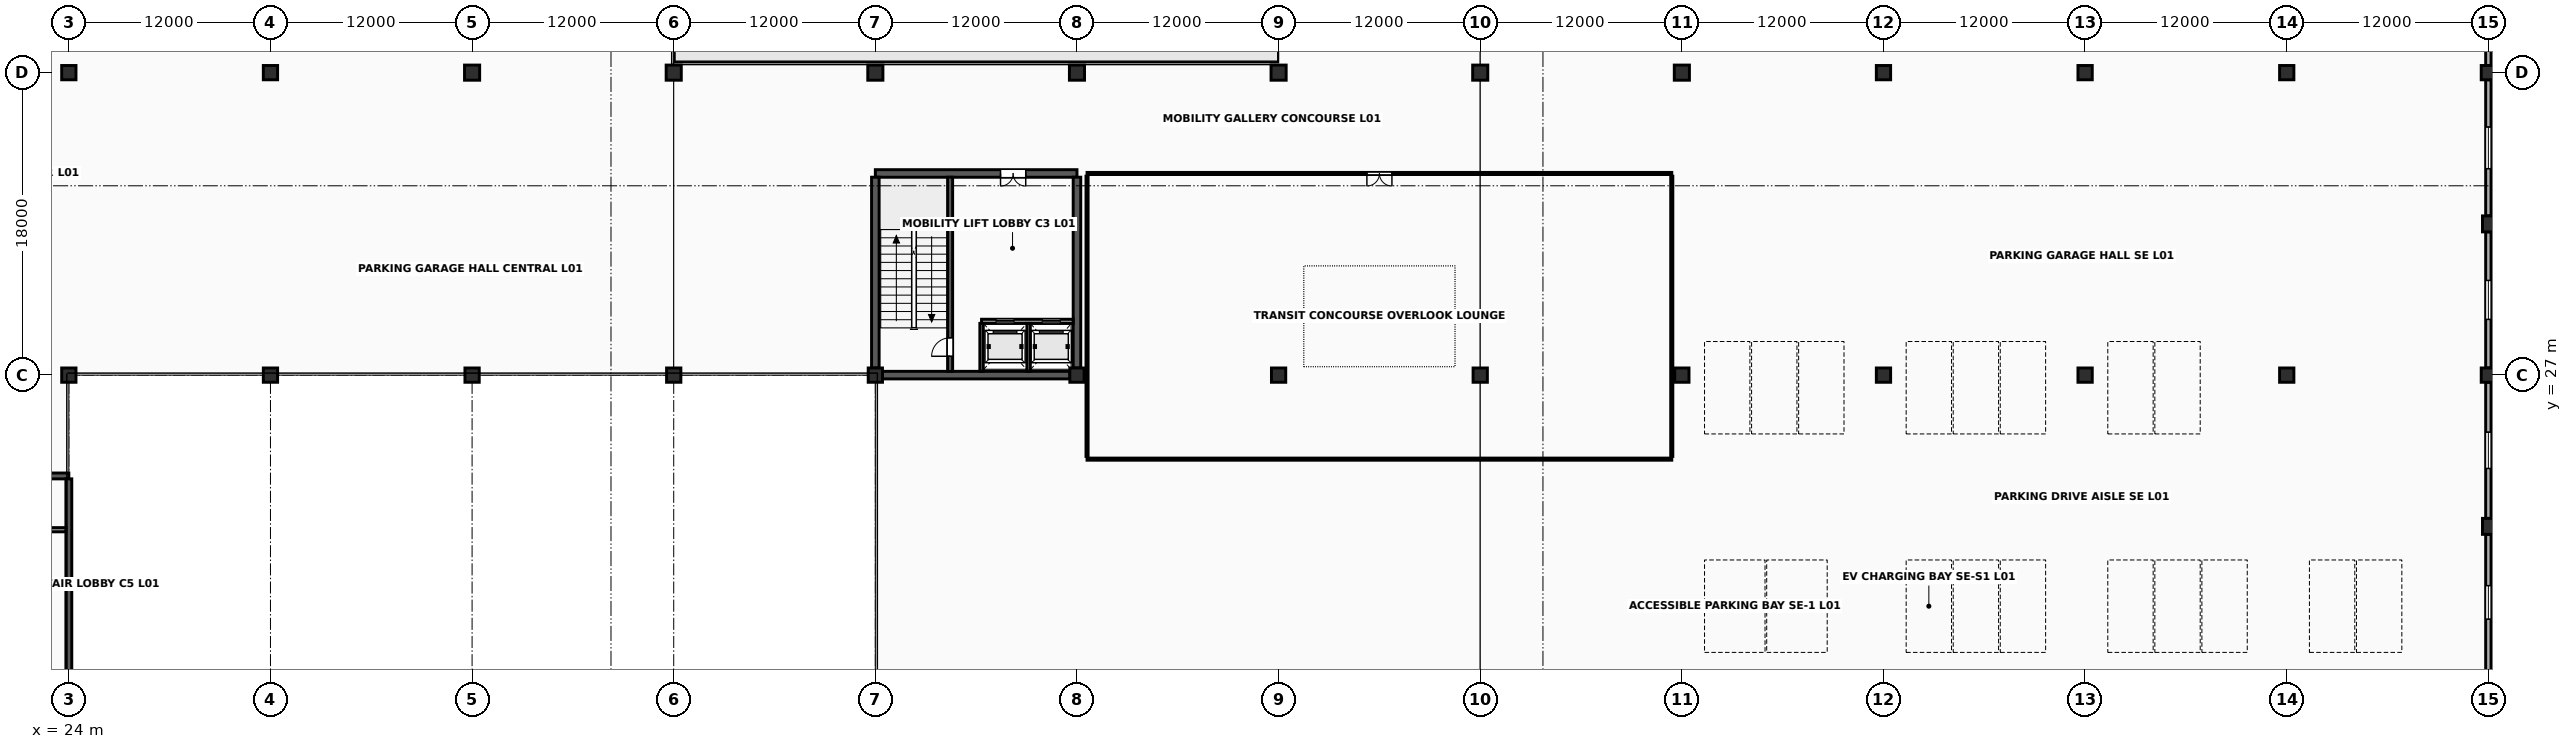
"""IFC4 building model, lengths in metres.
Left out: names, types, materials, properties, quantities, classifications, styles, units other than length and angle.
Written with IfcOpenShell. Run it as: python <this file> out.ifc"""

import sys

from ifc_helpers import new_model, si_unit, direction, frame, frame_2d, origin, origin_2d, place, context, subcontext, project, spatial, rectangle, extrude, element, fill, save


model = new_model("IFC4")
c1 = context("Model", 3, precision=1e-05, world=origin(), true_north=direction((0.0, 1.0)))
c2 = subcontext(c1, "Body", "Model", "MODEL_VIEW")
j1 = project(units=[si_unit("LENGTHUNIT", "METRE"), si_unit("PLANEANGLEUNIT", "RADIAN")], contexts=[c1])
p1 = place(None, origin())
s1 = spatial("IfcSite", under=j1, at=p1, CompositionType="ELEMENT")
p2 = place(p1, origin())
s2 = spatial("IfcBuilding", under=s1, at=p2, CompositionType="ELEMENT")
p3 = place(p2, frame((0.0, 0.0, 5.4)))
s3 = spatial("IfcBuildingStorey", under=s2, at=p3, CompositionType="ELEMENT", Elevation=5.4)
for number, where, z_axis, x_axis in (
    (1, (24.0, 27.0, 0.0), (0.0, 0.0, 1.0), (1.0, 0.0, 0.0)),
    (2, (24.0, 45.0, 0.0), (0.0, 0.0, 1.0), (1.0, 0.0, 0.0)),
    (3, (36.0, 27.0, 0.0), (0.0, 0.0, 1.0), (1.0, 0.0, 0.0)),
    (4, (36.0, 45.0, 0.0), (0.0, 0.0, 1.0), (1.0, 0.0, 0.0)),
    (5, (48.0, 27.0, 0.0), (0.0, 0.0, 1.0), (1.0, 0.0, 0.0)),
):
    element("IfcColumn", number, at=place(p3, frame(where, z_axis=z_axis, x_axis=x_axis)), inside=s3, PredefinedType="COLUMN", context=c2, shape_type="SweptSolid", body=[
        extrude(rectangle(XDim=0.85, YDim=0.85, at=origin_2d()), origin(), (0.0, 0.0, 1.0), 4.2),
    ])
p4 = place(p3, frame((48.0, 45.0, 0.0), z_axis=(0.0, 0.0, 1.0), x_axis=(1.0, 0.0, 0.0)))
e6 = element("IfcColumn", 6, at=p4, inside=s3, PredefinedType="COLUMN", context=c2, shape_type="SweptSolid", body=[
    extrude(rectangle(XDim=0.9, YDim=0.9, at=origin_2d()), origin(), (0.0, 0.0, 1.0), 4.2),
])
p5 = place(p3, frame((60.0, 27.0, 0.0), z_axis=(0.0, 0.0, 1.0), x_axis=(1.0, 0.0, 0.0)))
e7 = element("IfcColumn", 7, at=p5, inside=s3, PredefinedType="COLUMN", context=c2, shape_type="SweptSolid", body=[
    extrude(rectangle(XDim=0.85, YDim=0.85, at=origin_2d()), origin(), (0.0, 0.0, 1.0), 4.2),
])
p6 = place(p3, frame((60.0, 45.0, 0.0), z_axis=(0.0, 0.0, 1.0), x_axis=(1.0, 0.0, 0.0)))
e8 = element("IfcColumn", 8, at=p6, inside=s3, PredefinedType="COLUMN", context=c2, shape_type="SweptSolid", body=[
    extrude(rectangle(XDim=0.9, YDim=0.9, at=origin_2d()), origin(), (0.0, 0.0, 1.0), 4.2),
])
p7 = place(p3, frame((72.0, 27.0, 0.0), z_axis=(0.0, 0.0, 1.0), x_axis=(1.0, 0.0, 0.0)))
e9 = element("IfcColumn", 9, at=p7, inside=s3, PredefinedType="COLUMN", context=c2, shape_type="SweptSolid", body=[
    extrude(rectangle(XDim=0.85, YDim=0.85, at=origin_2d()), origin(), (0.0, 0.0, 1.0), 4.2),
])
p8 = place(p3, frame((72.0, 45.0, 0.0), z_axis=(0.0, 0.0, 1.0), x_axis=(1.0, 0.0, 0.0)))
e10 = element("IfcColumn", 10, at=p8, inside=s3, PredefinedType="COLUMN", context=c2, shape_type="SweptSolid", body=[
    extrude(rectangle(XDim=0.9, YDim=0.9, at=origin_2d()), origin(), (0.0, 0.0, 1.0), 4.2),
])
p9 = place(p3, frame((84.0, 27.0, 0.0), z_axis=(0.0, 0.0, 1.0), x_axis=(1.0, 0.0, 0.0)))
e11 = element("IfcColumn", 11, at=p9, inside=s3, PredefinedType="COLUMN", context=c2, shape_type="SweptSolid", body=[
    extrude(rectangle(XDim=0.85, YDim=0.85, at=origin_2d()), origin(), (0.0, 0.0, 1.0), 4.2),
])
p10 = place(p3, frame((84.0, 45.0, 0.0), z_axis=(0.0, 0.0, 1.0), x_axis=(1.0, 0.0, 0.0)))
e12 = element("IfcColumn", 12, at=p10, inside=s3, PredefinedType="COLUMN", context=c2, shape_type="SweptSolid", body=[
    extrude(rectangle(XDim=0.9, YDim=0.9, at=origin_2d()), origin(), (0.0, 0.0, 1.0), 4.2),
])
p11 = place(p3, frame((96.0, 27.0, 0.0), z_axis=(0.0, 0.0, 1.0), x_axis=(1.0, 0.0, 0.0)))
e13 = element("IfcColumn", 13, at=p11, inside=s3, PredefinedType="COLUMN", context=c2, shape_type="SweptSolid", body=[
    extrude(rectangle(XDim=0.85, YDim=0.85, at=origin_2d()), origin(), (0.0, 0.0, 1.0), 4.2),
])
p12 = place(p3, frame((96.0, 45.0, 0.0), z_axis=(0.0, 0.0, 1.0), x_axis=(1.0, 0.0, 0.0)))
e14 = element("IfcColumn", 14, at=p12, inside=s3, PredefinedType="COLUMN", context=c2, shape_type="SweptSolid", body=[
    extrude(rectangle(XDim=0.9, YDim=0.9, at=origin_2d()), origin(), (0.0, 0.0, 1.0), 4.2),
])
p13 = place(p3, frame((108.0, 27.0, 0.0), z_axis=(0.0, 0.0, 1.0), x_axis=(1.0, 0.0, 0.0)))
e15 = element("IfcColumn", 15, at=p13, inside=s3, PredefinedType="COLUMN", context=c2, shape_type="SweptSolid", body=[
    extrude(rectangle(XDim=0.85, YDim=0.85, at=origin_2d()), origin(), (0.0, 0.0, 1.0), 4.2),
])
p14 = place(p3, frame((108.0, 45.0, 0.0), z_axis=(0.0, 0.0, 1.0), x_axis=(1.0, 0.0, 0.0)))
e16 = element("IfcColumn", 16, at=p14, inside=s3, PredefinedType="COLUMN", context=c2, shape_type="SweptSolid", body=[
    extrude(rectangle(XDim=0.9, YDim=0.9, at=origin_2d()), origin(), (0.0, 0.0, 1.0), 4.2),
])
p15 = place(p3, frame((120.0, 27.0, 0.0), z_axis=(0.0, 0.0, 1.0), x_axis=(1.0, 0.0, 0.0)))
e17 = element("IfcColumn", 17, at=p15, inside=s3, PredefinedType="COLUMN", context=c2, shape_type="SweptSolid", body=[
    extrude(rectangle(XDim=0.85, YDim=0.85, at=origin_2d()), origin(), (0.0, 0.0, 1.0), 4.2),
])
p16 = place(p3, frame((120.0, 45.0, 0.0), z_axis=(0.0, 0.0, 1.0), x_axis=(1.0, 0.0, 0.0)))
e18 = element("IfcColumn", 18, at=p16, inside=s3, PredefinedType="COLUMN", context=c2, shape_type="SweptSolid", body=[
    extrude(rectangle(XDim=0.9, YDim=0.9, at=origin_2d()), origin(), (0.0, 0.0, 1.0), 4.2),
])
for number, where, z_axis, x_axis in (
    (19, (132.0, 27.0, 0.0), (0.0, 0.0, 1.0), (1.0, 0.0, 0.0)),
    (20, (132.0, 45.0, 0.0), (0.0, 0.0, 1.0), (1.0, 0.0, 0.0)),
    (21, (144.0, 27.0, 0.0), (0.0, 0.0, 1.0), (1.0, 0.0, 0.0)),
    (22, (144.0, 45.0, 0.0), (0.0, 0.0, 1.0), (1.0, 0.0, 0.0)),
    (23, (156.0, 27.0, 0.0), (0.0, 0.0, 1.0), (1.0, 0.0, 0.0)),
    (24, (156.0, 45.0, 0.0), (0.0, 0.0, 1.0), (1.0, 0.0, 0.0)),
    (25, (168.0, 27.0, 0.0), (0.0, 0.0, 1.0), (1.0, 0.0, 0.0)),
    (26, (168.0, 45.0, 0.0), (0.0, 0.0, 1.0), (1.0, 0.0, 0.0)),
):
    element("IfcColumn", number, at=place(p3, frame(where, z_axis=z_axis, x_axis=x_axis)), inside=s3, PredefinedType="COLUMN", context=c2, shape_type="SweptSolid", body=[
        extrude(rectangle(XDim=0.85, YDim=0.85, at=origin_2d()), origin(), (0.0, 0.0, 1.0), 4.2),
    ])
for number, where, z_axis, x_axis in (
    (27, (168.0, 18.0, 0.0), (0.0, 0.0, 1.0), (1.0, 0.0, 0.0)),
    (28, (168.0, 36.0, 0.0), (0.0, 0.0, 1.0), (1.0, 0.0, 0.0)),
):
    element("IfcColumn", number, at=place(p3, frame(where, z_axis=z_axis, x_axis=x_axis)), inside=s3, PredefinedType="PILASTER", context=c2, shape_type="SweptSolid", body=[
        extrude(rectangle(XDim=0.7, YDim=0.95, at=origin_2d()), origin(), (0.0, 0.0, 1.0), 4.2),
    ])
p17 = place(p3, frame((72.422, 27.0, 0.0), z_axis=(0.0, 0.0, 1.0), x_axis=(1.0, 0.0, 0.0)))
e29 = element("IfcWall", 29, at=p17, inside=s3, PredefinedType="SHEAR", context=c2, shape_type="SweptSolid", body=[
    extrude(rectangle(XDim=11.156, YDim=0.45, at=frame_2d((5.578, 0.0))), origin(), (0.0, 0.0, 1.0), 4.043),
])
p18 = place(p3, frame((72.0, 39.0, 0.0), z_axis=(0.0, 0.0, 1.0), x_axis=(1.0, 0.0, 0.0)))
e30 = element("IfcWall", 30, at=p18, inside=s3, PredefinedType="SHEAR", context=c2, shape_type="SweptSolid", body=[
    extrude(rectangle(XDim=12.0, YDim=0.45, at=frame_2d((6.0, 0.0))), origin(), (0.0, 0.0, 1.0), 4.043),
])
p19 = place(p18, frame((7.45, 0.0, 0.0)))
e31 = element("IfcOpeningElement", 31, at=p19, cuts=e30, PredefinedType="OPENING", context=c2, shape_type="SweptSolid", body=[
    extrude(rectangle(XDim=1.5, YDim=2.25, at=frame_2d((0.75, 1.125))), frame((0.0, 0.24, 0.0), z_axis=(0.0, -1.0, 0.0), x_axis=(1.0, 0.0, 0.0)), (0.0, 0.0, 1.0), 0.48),
])
for number, where, z_axis, x_axis in (
    (32, (72.0, 27.422, 0.0), (0.0, 0.0, 1.0), (0.0, 1.0, 0.0)),
    (33, (84.0, 27.422, 0.0), (0.0, 0.0, 1.0), (0.0, 1.0, 0.0)),
):
    element("IfcWall", number, at=place(p3, frame(where, z_axis=z_axis, x_axis=x_axis)), inside=s3, PredefinedType="SHEAR", context=c2, shape_type="SweptSolid", body=[
        extrude(rectangle(XDim=11.356, YDim=0.45, at=frame_2d((5.678, 0.0))), origin(), (0.0, 0.0, 1.0), 4.043),
    ])
p20 = place(p3, frame((76.45, 27.222, 0.0), z_axis=(0.0, 0.0, 1.0), x_axis=(0.0, 1.0, 0.0)))
e34 = element("IfcWall", 34, at=p20, inside=s3, PredefinedType="SHEAR", context=c2, shape_type="SweptSolid", body=[
    extrude(rectangle(XDim=11.556, YDim=0.3, at=frame_2d((5.778, 0.0))), origin(), (0.0, 0.0, 1.0), 4.043),
])
p21 = place(p20, frame((0.9, 0.0, 0.0)))
e35 = element("IfcOpeningElement", 35, at=p21, cuts=e34, PredefinedType="OPENING", context=c2, shape_type="SweptSolid", body=[
    extrude(rectangle(XDim=1.1, YDim=2.2, at=frame_2d((0.55, 1.1))), frame((0.0, 0.165, 0.0), z_axis=(0.0, -1.0, 0.0), x_axis=(1.0, 0.0, 0.0)), (0.0, 0.0, 1.0), 0.33),
])
p22 = place(p3, frame((78.32, 30.2, 0.0), z_axis=(0.0, 0.0, 1.0), x_axis=(1.0, 0.0, 0.0)))
e36 = element("IfcWall", 36, at=p22, inside=s3, PredefinedType="SOLIDWALL", context=c2, shape_type="SweptSolid", body=[
    extrude(rectangle(XDim=5.458, YDim=0.25, at=frame_2d((2.729, 0.0))), origin(), (0.0, 0.0, 1.0), 4.043),
])
p23 = place(p22, frame((0.86, 0.0, 0.0)))
e37 = element("IfcOpeningElement", 37, at=p23, cuts=e36, PredefinedType="OPENING", context=c2, shape_type="SweptSolid", body=[
    extrude(rectangle(XDim=1.08, YDim=2.22, at=frame_2d((0.54, 1.11))), frame((0.0, 0.14, 0.0), z_axis=(0.0, -1.0, 0.0), x_axis=(1.0, 0.0, 0.0)), (0.0, 0.0, 1.0), 0.28),
])
p24 = place(p22, frame((3.61, 0.0, 0.0)))
e38 = element("IfcOpeningElement", 38, at=p24, cuts=e36, PredefinedType="OPENING", context=c2, shape_type="SweptSolid", body=[
    extrude(rectangle(XDim=1.08, YDim=2.22, at=frame_2d((0.54, 1.11))), frame((0.0, 0.14, 0.0), z_axis=(0.0, -1.0, 0.0), x_axis=(1.0, 0.0, 0.0)), (0.0, 0.0, 1.0), 0.28),
])
for number, where, z_axis, x_axis in (
    (39, (78.32, 27.225, 0.0), (0.0, 0.0, 1.0), (0.0, 1.0, 0.0)),
    (40, (81.12, 27.225, 0.0), (0.0, 0.0, 1.0), (0.0, 1.0, 0.0)),
):
    element("IfcWall", number, at=place(p3, frame(where, z_axis=z_axis, x_axis=x_axis)), inside=s3, PredefinedType="SOLIDWALL", context=c2, shape_type="SweptSolid", body=[
        extrude(rectangle(XDim=2.855, YDim=0.2, at=frame_2d((1.427, 0.0))), origin(), (0.0, 0.0, 1.0), 4.033),
    ])
p25 = place(p3, frame((12.0, 21.0, 0.0), z_axis=(0.0, 0.0, 1.0), x_axis=(1.0, 0.0, 0.0)))
e41 = element("IfcWall", 41, at=p25, inside=s3, PredefinedType="SHEAR", context=c2, shape_type="SweptSolid", body=[
    extrude(rectangle(XDim=12.0, YDim=0.35, at=frame_2d((6.0, 0.0))), origin(), (0.0, 0.0, 1.0), 4.043),
])
p26 = place(p25, frame((7.45, 0.0, 0.0)))
e42 = element("IfcOpeningElement", 42, at=p26, cuts=e41, PredefinedType="OPENING", context=c2, shape_type="SweptSolid", body=[
    extrude(rectangle(XDim=1.4, YDim=2.22, at=frame_2d((0.7, 1.11))), frame((0.0, 0.19, 0.0), z_axis=(0.0, -1.0, 0.0), x_axis=(1.0, 0.0, 0.0)), (0.0, 0.0, 1.0), 0.38),
])
p27 = place(p3, frame((24.0, 9.422, 0.0), z_axis=(0.0, 0.0, 1.0), x_axis=(0.0, 1.0, 0.0)))
e43 = element("IfcWall", 43, at=p27, inside=s3, PredefinedType="SHEAR", context=c2, shape_type="SweptSolid", body=[
    extrude(rectangle(XDim=11.406, YDim=0.35, at=frame_2d((5.703, 0.0))), origin(), (0.0, 0.0, 1.0), 4.043),
])
p28 = place(p3, frame((16.597, 17.8, 0.0), z_axis=(0.0, 0.0, 1.0), x_axis=(1.0, 0.0, 0.0)))
e44 = element("IfcWall", 44, at=p28, inside=s3, PredefinedType="SOLIDWALL", context=c2, shape_type="SweptSolid", body=[
    extrude(rectangle(XDim=7.231, YDim=0.25, at=frame_2d((3.615, 0.0))), origin(), (0.0, 0.0, 1.0), 4.043),
])
p29 = place(p3, frame((168.0, 9.423, 0.0), z_axis=(0.0, 0.0, 1.0), x_axis=(0.0, 1.0, 0.0)))
e45 = element("IfcWall", 45, at=p29, inside=s3, PredefinedType="SOLIDWALL", context=c2, shape_type="SweptSolid", body=[
    extrude(rectangle(XDim=8.104, YDim=0.32, at=frame_2d((4.052, 0.0))), origin(), (0.0, 0.0, 1.0), 2.69),
])
p30 = place(p29, frame((3.052, 0.0, 0.55)))
e46 = element("IfcOpeningElement", 46, at=p30, cuts=e45, PredefinedType="OPENING", context=c2, shape_type="SweptSolid", body=[
    extrude(rectangle(XDim=2.0, YDim=1.42, at=frame_2d((1.0, 0.71))), frame((0.0, 0.175, 0.0), z_axis=(0.0, -1.0, 0.0), x_axis=(1.0, 0.0, 0.0)), (0.0, 0.0, 1.0), 0.35),
])
p31 = place(p3, frame((168.0, 18.473, 0.0), z_axis=(0.0, 0.0, 1.0), x_axis=(0.0, 1.0, 0.0)))
e47 = element("IfcWall", 47, at=p31, inside=s3, PredefinedType="SOLIDWALL", context=c2, shape_type="SweptSolid", body=[
    extrude(rectangle(XDim=8.104, YDim=0.32, at=frame_2d((4.052, 0.0))), origin(), (0.0, 0.0, 1.0), 2.69),
])
p32 = place(p31, frame((2.972, 0.0, 0.55)))
e48 = element("IfcOpeningElement", 48, at=p32, cuts=e47, PredefinedType="OPENING", context=c2, shape_type="SweptSolid", body=[
    extrude(rectangle(XDim=2.16, YDim=1.42, at=frame_2d((1.08, 0.71))), frame((0.0, 0.175, 0.0), z_axis=(0.0, -1.0, 0.0), x_axis=(1.0, 0.0, 0.0)), (0.0, 0.0, 1.0), 0.35),
])
p33 = place(p3, frame((168.0, 27.423, 0.0), z_axis=(0.0, 0.0, 1.0), x_axis=(0.0, 1.0, 0.0)))
e49 = element("IfcWall", 49, at=p33, inside=s3, PredefinedType="SOLIDWALL", context=c2, shape_type="SweptSolid", body=[
    extrude(rectangle(XDim=8.104, YDim=0.32, at=frame_2d((4.052, 0.0))), origin(), (0.0, 0.0, 1.0), 2.69),
])
p34 = place(p33, frame((2.892, 0.0, 0.55)))
e50 = element("IfcOpeningElement", 50, at=p34, cuts=e49, PredefinedType="OPENING", context=c2, shape_type="SweptSolid", body=[
    extrude(rectangle(XDim=2.32, YDim=1.42, at=frame_2d((1.16, 0.71))), frame((0.0, 0.175, 0.0), z_axis=(0.0, -1.0, 0.0), x_axis=(1.0, 0.0, 0.0)), (0.0, 0.0, 1.0), 0.35),
])
p35 = place(p3, frame((168.0, 36.473, 0.0), z_axis=(0.0, 0.0, 1.0), x_axis=(0.0, 1.0, 0.0)))
e51 = element("IfcWall", 51, at=p35, inside=s3, PredefinedType="SOLIDWALL", context=c2, shape_type="SweptSolid", body=[
    extrude(rectangle(XDim=8.104, YDim=0.32, at=frame_2d((4.052, 0.0))), origin(), (0.0, 0.0, 1.0), 2.69),
])
p36 = place(p35, frame((2.812, 0.0, 0.55)))
e52 = element("IfcOpeningElement", 52, at=p36, cuts=e51, PredefinedType="OPENING", context=c2, shape_type="SweptSolid", body=[
    extrude(rectangle(XDim=2.48, YDim=1.42, at=frame_2d((1.24, 0.71))), frame((0.0, 0.175, 0.0), z_axis=(0.0, -1.0, 0.0), x_axis=(1.0, 0.0, 0.0)), (0.0, 0.0, 1.0), 0.35),
])
p37 = place(p3, frame((168.0, 45.423, 0.0), z_axis=(0.0, 0.0, 1.0), x_axis=(0.0, 1.0, 0.0)))
e53 = element("IfcWall", 53, at=p37, inside=s3, PredefinedType="SOLIDWALL", context=c2, shape_type="SweptSolid", body=[
    extrude(rectangle(XDim=11.154, YDim=0.32, at=frame_2d((5.577, 0.0))), origin(), (0.0, 0.0, 1.0), 2.69),
])
p38 = place(p37, frame((4.987, 0.0, 0.55)))
e54 = element("IfcOpeningElement", 54, at=p38, cuts=e53, PredefinedType="OPENING", context=c2, shape_type="SweptSolid", body=[
    extrude(rectangle(XDim=1.18, YDim=1.58, at=frame_2d((0.59, 0.79))), frame((0.0, 0.175, 0.0), z_axis=(0.0, -1.0, 0.0), x_axis=(1.0, 0.0, 0.0)), (0.0, 0.0, 1.0), 0.35),
])
p39 = place(p3, frame((84.6, 22.0, 0.0), z_axis=(0.0, 0.0, 1.0), x_axis=(1.0, 0.0, 0.0)))
e55 = element("IfcWall", 55, at=p39, inside=s3, PredefinedType="PARTITIONING", context=c2, shape_type="SweptSolid", body=[
    extrude(rectangle(XDim=34.8, YDim=0.125, at=frame_2d((17.4, 0.0))), origin(), (0.0, 0.0, 1.0), 2.75),
])
p40 = place(p3, frame((84.6, 39.0, 0.0), z_axis=(0.0, 0.0, 1.0), x_axis=(1.0, 0.0, 0.0)))
e56 = element("IfcWall", 56, at=p40, inside=s3, PredefinedType="PARTITIONING", context=c2, shape_type="SweptSolid", body=[
    extrude(rectangle(XDim=34.8, YDim=0.125, at=frame_2d((17.4, 0.0))), origin(), (0.0, 0.0, 1.0), 2.75),
])
p41 = place(p40, frame((16.655, 0.0, 0.0)))
e57 = element("IfcOpeningElement", 57, at=p41, cuts=e56, PredefinedType="OPENING", context=c2, shape_type="SweptSolid", body=[
    extrude(rectangle(XDim=1.49, YDim=2.28, at=frame_2d((0.745, 1.14))), frame((0.0, 0.077, 0.0), z_axis=(0.0, -1.0, 0.0), x_axis=(1.0, 0.0, 0.0)), (0.0, 0.0, 1.0), 0.155),
])
for number, where, z_axis, x_axis in (
    (58, (84.6, 22.16, 0.0), (0.0, 0.0, 1.0), (0.0, 1.0, 0.0)),
    (59, (119.4, 22.16, 0.0), (0.0, 0.0, 1.0), (0.0, 1.0, 0.0)),
):
    element("IfcWall", number, at=place(p3, frame(where, z_axis=z_axis, x_axis=x_axis)), inside=s3, PredefinedType="PARTITIONING", context=c2, shape_type="SweptSolid", body=[
        extrude(rectangle(XDim=16.68, YDim=0.125, at=frame_2d((8.34, 0.0))), origin(), (0.0, 0.0, 1.0), 2.75),
    ])
p42 = place(p30, origin())
e60 = element("IfcWindow", 60, at=p42, inside=s3, PartitioningType="DOUBLE_PANEL_VERTICAL", PredefinedType="WINDOW", context=c2, shape_type="SweptSolid", body=[
    extrude(rectangle(XDim=2.0, YDim=1.42, at=frame_2d((1.0, 0.71))), frame((0.0, 0.03, 0.0), z_axis=(0.0, -1.0, 0.0), x_axis=(1.0, 0.0, 0.0)), (0.0, 0.0, 1.0), 0.06),
])
fill(e46, e60)
p43 = place(p32, origin())
e61 = element("IfcWindow", 61, at=p43, inside=s3, PartitioningType="DOUBLE_PANEL_VERTICAL", PredefinedType="WINDOW", context=c2, shape_type="SweptSolid", body=[
    extrude(rectangle(XDim=2.16, YDim=1.42, at=frame_2d((1.08, 0.71))), frame((0.0, 0.03, 0.0), z_axis=(0.0, -1.0, 0.0), x_axis=(1.0, 0.0, 0.0)), (0.0, 0.0, 1.0), 0.06),
])
fill(e48, e61)
p44 = place(p34, origin())
e62 = element("IfcWindow", 62, at=p44, inside=s3, PartitioningType="DOUBLE_PANEL_VERTICAL", PredefinedType="WINDOW", context=c2, shape_type="SweptSolid", body=[
    extrude(rectangle(XDim=2.32, YDim=1.42, at=frame_2d((1.16, 0.71))), frame((0.0, 0.03, 0.0), z_axis=(0.0, -1.0, 0.0), x_axis=(1.0, 0.0, 0.0)), (0.0, 0.0, 1.0), 0.06),
])
fill(e50, e62)
p45 = place(p36, origin())
e63 = element("IfcWindow", 63, at=p45, inside=s3, PartitioningType="DOUBLE_PANEL_VERTICAL", PredefinedType="WINDOW", context=c2, shape_type="SweptSolid", body=[
    extrude(rectangle(XDim=2.48, YDim=1.42, at=frame_2d((1.24, 0.71))), frame((0.0, 0.03, 0.0), z_axis=(0.0, -1.0, 0.0), x_axis=(1.0, 0.0, 0.0)), (0.0, 0.0, 1.0), 0.06),
])
fill(e52, e63)
p46 = place(p21, origin())
e64 = element("IfcDoor", 64, at=p46, inside=s3, OperationType="SINGLE_SWING_LEFT", PredefinedType="DOOR", context=c2, shape_type="SweptSolid", body=[
    extrude(rectangle(XDim=1.1, YDim=2.2, at=frame_2d((0.55, 1.1))), frame((0.0, 0.025, 0.0), z_axis=(0.0, -1.0, 0.0), x_axis=(1.0, 0.0, 0.0)), (0.0, 0.0, 1.0), 0.05),
])
fill(e35, e64)
p47 = place(p19, origin())
e65 = element("IfcDoor", 65, at=p47, inside=s3, OperationType="DOUBLE_DOOR_SINGLE_SWING", PredefinedType="DOOR", context=c2, shape_type="SweptSolid", body=[
    extrude(rectangle(XDim=1.5, YDim=2.25, at=frame_2d((0.75, 1.125))), frame((0.0, 0.025, 0.0), z_axis=(0.0, -1.0, 0.0), x_axis=(1.0, 0.0, 0.0)), (0.0, 0.0, 1.0), 0.05),
])
fill(e31, e65)
p48 = place(p23, origin())
e66 = element("IfcDoor", 66, at=p48, inside=s3, OperationType="SLIDING_TO_LEFT", PredefinedType="USERDEFINED", context=c2, shape_type="SweptSolid", body=[
    extrude(rectangle(XDim=1.08, YDim=2.22, at=frame_2d((0.54, 1.11))), frame((0.0, 0.025, 0.0), z_axis=(0.0, -1.0, 0.0), x_axis=(1.0, 0.0, 0.0)), (0.0, 0.0, 1.0), 0.05),
])
fill(e37, e66)
p49 = place(p24, origin())
e67 = element("IfcDoor", 67, at=p49, inside=s3, OperationType="SLIDING_TO_LEFT", PredefinedType="USERDEFINED", context=c2, shape_type="SweptSolid", body=[
    extrude(rectangle(XDim=1.08, YDim=2.22, at=frame_2d((0.54, 1.11))), frame((0.0, 0.025, 0.0), z_axis=(0.0, -1.0, 0.0), x_axis=(1.0, 0.0, 0.0)), (0.0, 0.0, 1.0), 0.05),
])
fill(e38, e67)
p50 = place(p41, origin())
e68 = element("IfcDoor", 68, at=p50, inside=s3, OperationType="DOUBLE_DOOR_SINGLE_SWING", PredefinedType="DOOR", context=c2, shape_type="SweptSolid", body=[
    extrude(rectangle(XDim=1.49, YDim=2.28, at=frame_2d((0.745, 1.14))), frame((0.0, 0.025, 0.0), z_axis=(0.0, -1.0, 0.0), x_axis=(1.0, 0.0, 0.0)), (0.0, 0.0, 1.0), 0.05),
])
fill(e57, e68)
save(model, sys.argv[1])
